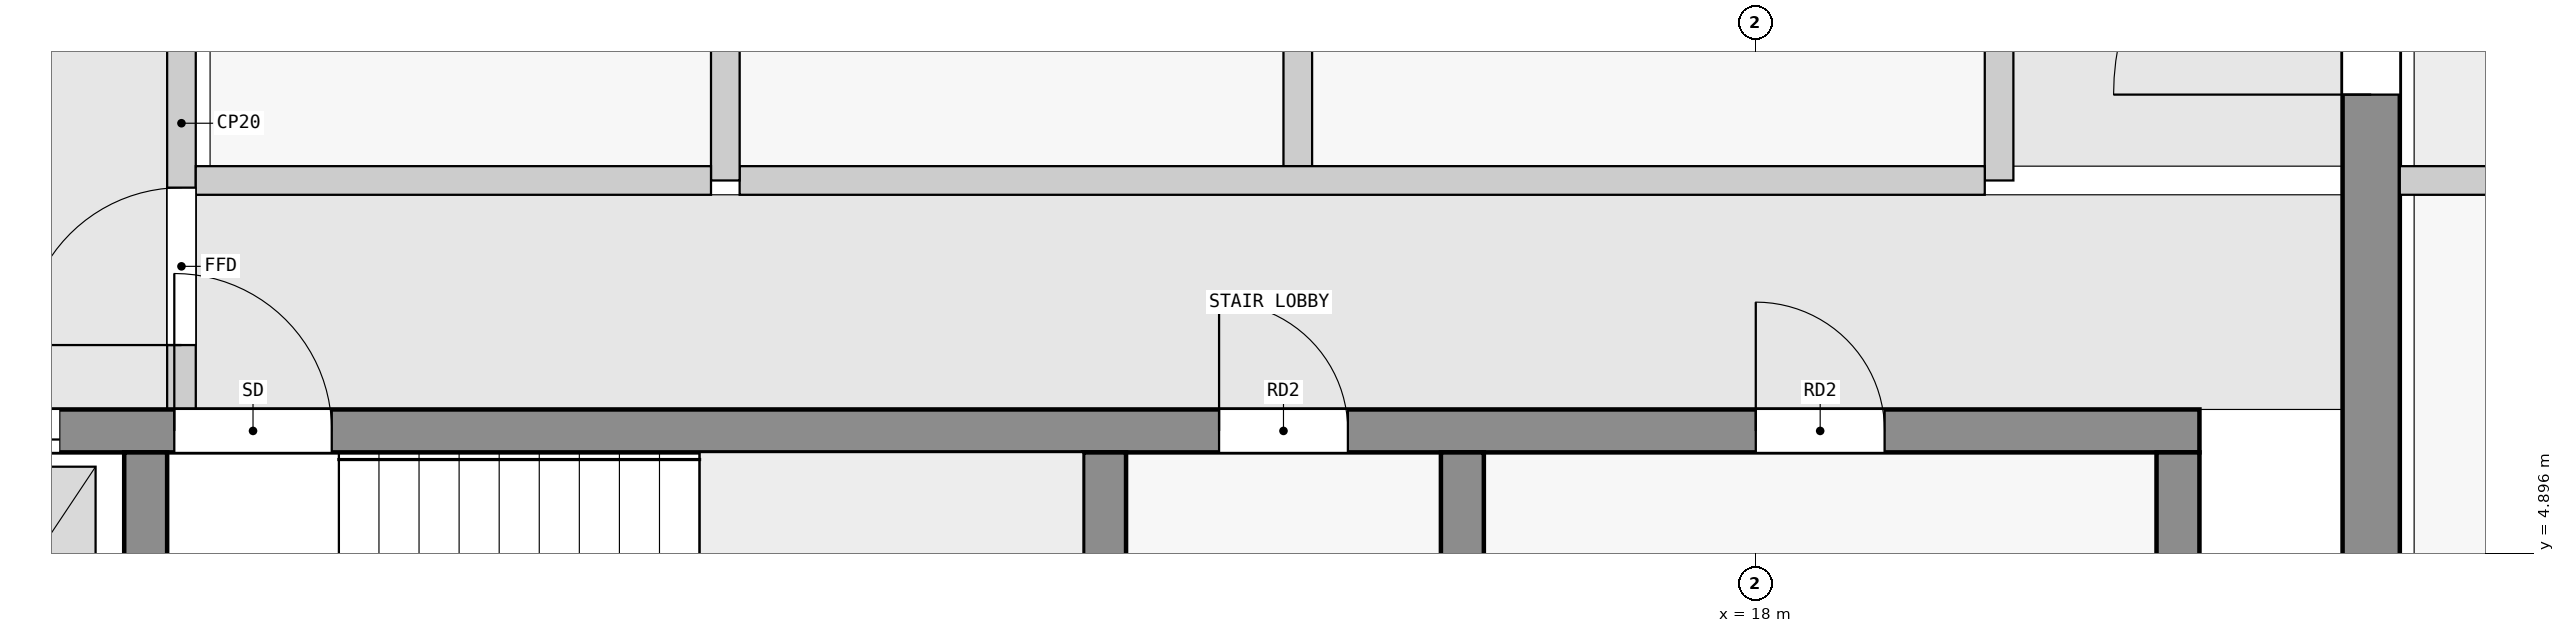
"""IFC4 building model, lengths in metres.
Left out: names, types, materials, properties, quantities, classifications, styles, units other than length and angle.
Written with IfcOpenShell. Run it as: python <this file> out.ifc"""

import sys

from ifc_helpers import new_model, si_unit, direction, frame, frame_2d, origin, place, context, subcontext, project, spatial, rectangle, extrude, element, fill, save


model = new_model("IFC4")
c1 = context("Model", 3, precision=1e-05, world=origin(), true_north=direction((0.0, 1.0)))
c2 = subcontext(c1, "Body", "Model", "MODEL_VIEW")
j1 = project(units=[si_unit("LENGTHUNIT", "METRE"), si_unit("PLANEANGLEUNIT", "RADIAN")], contexts=[c1])
p1 = place(None, origin())
s1 = spatial("IfcSite", under=j1, at=p1, CompositionType="ELEMENT")
p2 = place(p1, origin())
s2 = spatial("IfcBuilding", under=s1, at=p2, CompositionType="ELEMENT")
p3 = place(p2, frame((0.0, 0.0, 298.4)))
s3 = spatial("IfcBuildingStorey", under=s2, at=p3, CompositionType="ELEMENT", Elevation=298.4)
p4 = place(p3, frame((22.3, 2.5, 0.0), z_axis=(0.0, 0.0, 1.0), x_axis=(0.0, 1.0, 0.0)))
e1 = element("IfcWall", 1, at=p4, inside=s3, PredefinedType="SHEAR", context=c2, shape_type="SweptSolid", body=[
    extrude(rectangle(XDim=15.1, YDim=0.4, at=frame_2d((7.55, 0.0))), origin(), (0.0, 0.0, 1.0), 3.05),
])
p5 = place(p4, frame((5.6, 0.0, 0.0)))
e2 = element("IfcOpeningElement", 2, at=p5, cuts=e1, PredefinedType="OPENING", context=c2, shape_type="SweptSolid", body=[
    extrude(rectangle(XDim=1.8, YDim=2.1, at=frame_2d((0.9, 1.05))), frame((0.0, 0.21, 0.0), z_axis=(0.0, -1.0, 0.0), x_axis=(1.0, 0.0, 0.0)), (0.0, 0.0, 1.0), 0.42),
])
for number, where, z_axis, x_axis in (
    (3, (6.75, 2.8, 0.0), (0.0, 0.0, 1.0), (0.0, 1.0, 0.0)),
    (4, (13.45, 2.8, 0.0), (0.0, 0.0, 1.0), (0.0, 1.0, 0.0)),
    (5, (15.95, 2.8, 0.0), (0.0, 0.0, 1.0), (0.0, 1.0, 0.0)),
    (6, (20.95, 2.8, 0.0), (0.0, 0.0, 1.0), (0.0, 1.0, 0.0)),
):
    element("IfcWall", number, at=place(p3, frame(where, z_axis=z_axis, x_axis=x_axis)), inside=s3, PredefinedType="SHEAR", context=c2, shape_type="SweptSolid", body=[
        extrude(rectangle(XDim=2.8, YDim=0.3, at=frame_2d((1.4, 0.0))), origin(), (0.0, 0.0, 1.0), 3.05),
    ])
p6 = place(p3, frame((2.3, 5.75, 0.0), z_axis=(0.0, 0.0, 1.0), x_axis=(1.0, 0.0, 0.0)))
e7 = element("IfcWall", 7, at=p6, inside=s3, PredefinedType="SHEAR", context=c2, shape_type="SweptSolid", body=[
    extrude(rectangle(XDim=18.8, YDim=0.3, at=frame_2d((9.4, 0.0))), origin(), (0.0, 0.0, 1.0), 3.05),
])
p7 = place(p6, frame((4.65, 0.0, 0.0)))
e8 = element("IfcOpeningElement", 8, at=p7, cuts=e7, PredefinedType="OPENING", context=c2, shape_type="SweptSolid", body=[
    extrude(rectangle(XDim=1.1, YDim=2.1, at=frame_2d((0.55, 1.05))), frame((0.0, 0.16, 0.0), z_axis=(0.0, -1.0, 0.0), x_axis=(1.0, 0.0, 0.0)), (0.0, 0.0, 1.0), 0.32),
])
p8 = place(p6, frame((0.45, 0.0, 0.0)))
e9 = element("IfcOpeningElement", 9, at=p8, cuts=e7, PredefinedType="OPENING", context=c2, shape_type="SweptSolid", body=[
    extrude(rectangle(XDim=1.1, YDim=2.1, at=frame_2d((0.55, 1.05))), frame((0.0, 0.16, 0.0), z_axis=(0.0, -1.0, 0.0), x_axis=(1.0, 0.0, 0.0)), (0.0, 0.0, 1.0), 0.32),
])
p9 = place(p6, frame((2.75, 0.0, 0.0)))
e10 = element("IfcOpeningElement", 10, at=p9, cuts=e7, PredefinedType="OPENING", context=c2, shape_type="SweptSolid", body=[
    extrude(rectangle(XDim=1.1, YDim=2.1, at=frame_2d((0.55, 1.05))), frame((0.0, 0.16, 0.0), z_axis=(0.0, -1.0, 0.0), x_axis=(1.0, 0.0, 0.0)), (0.0, 0.0, 1.0), 0.32),
])
p10 = place(p6, frame((11.95, 0.0, 0.0)))
e11 = element("IfcOpeningElement", 11, at=p10, cuts=e7, PredefinedType="OPENING", context=c2, shape_type="SweptSolid", body=[
    extrude(rectangle(XDim=0.9, YDim=2.1, at=frame_2d((0.45, 1.05))), frame((0.0, 0.16, 0.0), z_axis=(0.0, -1.0, 0.0), x_axis=(1.0, 0.0, 0.0)), (0.0, 0.0, 1.0), 0.32),
])
p11 = place(p6, frame((15.7, 0.0, 0.0)))
e12 = element("IfcOpeningElement", 12, at=p11, cuts=e7, PredefinedType="OPENING", context=c2, shape_type="SweptSolid", body=[
    extrude(rectangle(XDim=0.9, YDim=2.1, at=frame_2d((0.45, 1.05))), frame((0.0, 0.16, 0.0), z_axis=(0.0, -1.0, 0.0), x_axis=(1.0, 0.0, 0.0)), (0.0, 0.0, 1.0), 0.32),
])
p12 = place(p3, frame((7.0, 5.9, 0.0), z_axis=(0.0, 0.0, 1.0), x_axis=(0.0, 1.0, 0.0)))
e13 = element("IfcWall", 13, at=p12, inside=s3, PredefinedType="PARTITIONING", context=c2, shape_type="SweptSolid", body=[
    extrude(rectangle(XDim=4.0, YDim=0.2, at=frame_2d((2.0, 0.0))), origin(), (0.0, 0.0, 1.0), 3.05),
])
p13 = place(p12, frame((0.45, 0.0, 0.0)))
e14 = element("IfcOpeningElement", 14, at=p13, cuts=e13, PredefinedType="OPENING", context=c2, shape_type="SweptSolid", body=[
    extrude(rectangle(XDim=1.1, YDim=2.1, at=frame_2d((0.55, 1.05))), frame((0.0, 0.11, 0.0), z_axis=(0.0, -1.0, 0.0), x_axis=(1.0, 0.0, 0.0)), (0.0, 0.0, 1.0), 0.22),
])
p14 = place(p3, frame((7.1, 7.5, 0.0), z_axis=(0.0, 0.0, 1.0), x_axis=(1.0, 0.0, 0.0)))
e15 = element("IfcWall", 15, at=p14, inside=s3, PredefinedType="PARTITIONING", context=c2, shape_type="SweptSolid", body=[
    extrude(rectangle(XDim=3.6, YDim=0.2, at=frame_2d((1.8, 0.0))), origin(), (0.0, 0.0, 1.0), 3.05),
])
p15 = place(p3, frame((10.8, 7.5, 0.0), z_axis=(0.0, 0.0, 1.0), x_axis=(0.0, 1.0, 0.0)))
e16 = element("IfcWall", 16, at=p15, inside=s3, PredefinedType="PARTITIONING", context=c2, shape_type="SweptSolid", body=[
    extrude(rectangle(XDim=4.7, YDim=0.2, at=frame_2d((2.35, 0.0))), origin(), (0.0, 0.0, 1.0), 3.05),
])
p16 = place(p3, frame((10.9, 7.5, 0.0), z_axis=(0.0, 0.0, 1.0), x_axis=(1.0, 0.0, 0.0)))
e17 = element("IfcWall", 17, at=p16, inside=s3, PredefinedType="PARTITIONING", context=c2, shape_type="SweptSolid", body=[
    extrude(rectangle(XDim=8.7, YDim=0.2, at=frame_2d((4.35, 0.0))), origin(), (0.0, 0.0, 1.0), 3.05),
])
p17 = place(p3, frame((19.7, 7.5, 0.0), z_axis=(0.0, 0.0, 1.0), x_axis=(0.0, 1.0, 0.0)))
e18 = element("IfcWall", 18, at=p17, inside=s3, PredefinedType="PARTITIONING", context=c2, shape_type="SweptSolid", body=[
    extrude(rectangle(XDim=4.7, YDim=0.2, at=frame_2d((2.35, 0.0))), origin(), (0.0, 0.0, 1.0), 3.05),
])
for number, where, z_axis, x_axis in (
    (19, (14.8, 7.6, 0.0), (0.0, 0.0, 1.0), (0.0, 1.0, 0.0)),
    (20, (27.0, 7.5, 0.0), (0.0, 0.0, 1.0), (-1.0, 0.0, 0.0)),
):
    element("IfcWall", number, at=place(p3, frame(where, z_axis=z_axis, x_axis=x_axis)), inside=s3, PredefinedType="PARTITIONING", context=c2, shape_type="SweptSolid", body=[
        extrude(rectangle(XDim=4.5, YDim=0.2, at=frame_2d((2.25, 0.0))), origin(), (0.0, 0.0, 1.0), 3.05),
    ])
p18 = place(p13, origin())
e21 = element("IfcDoor", 21, at=p18, inside=s3, OperationType="SINGLE_SWING_LEFT", PredefinedType="DOOR", context=c2, shape_type="SweptSolid", body=[
    extrude(rectangle(XDim=1.1, YDim=2.1, at=frame_2d((0.55, 1.05))), frame((0.0, 0.025, 0.0), z_axis=(0.0, -1.0, 0.0), x_axis=(1.0, 0.0, 0.0)), (0.0, 0.0, 1.0), 0.05),
])
fill(e14, e21)
p19 = place(p7, origin())
e22 = element("IfcDoor", 22, at=p19, inside=s3, OperationType="SINGLE_SWING_LEFT", PredefinedType="DOOR", context=c2, shape_type="SweptSolid", body=[
    extrude(rectangle(XDim=1.1, YDim=2.1, at=frame_2d((0.55, 1.05))), frame((0.0, 0.025, 0.0), z_axis=(0.0, -1.0, 0.0), x_axis=(1.0, 0.0, 0.0)), (0.0, 0.0, 1.0), 0.05),
])
fill(e8, e22)
p20 = place(p9, origin())
e23 = element("IfcDoor", 23, at=p20, inside=s3, OperationType="DOUBLE_DOOR_SLIDING", PredefinedType="DOOR", context=c2, shape_type="SweptSolid", body=[
    extrude(rectangle(XDim=1.1, YDim=2.1, at=frame_2d((0.55, 1.05))), frame((0.0, 0.025, 0.0), z_axis=(0.0, -1.0, 0.0), x_axis=(1.0, 0.0, 0.0)), (0.0, 0.0, 1.0), 0.05),
])
fill(e10, e23)
p21 = place(p5, origin())
e24 = element("IfcDoor", 24, at=p21, inside=s3, OperationType="DOUBLE_DOOR_SINGLE_SWING", PredefinedType="DOOR", context=c2, shape_type="SweptSolid", body=[
    extrude(rectangle(XDim=1.8, YDim=2.1, at=frame_2d((0.9, 1.05))), frame((0.0, 0.025, 0.0), z_axis=(0.0, -1.0, 0.0), x_axis=(1.0, 0.0, 0.0)), (0.0, 0.0, 1.0), 0.05),
])
fill(e2, e24)
p22 = place(p10, origin())
e25 = element("IfcDoor", 25, at=p22, inside=s3, OperationType="SINGLE_SWING_LEFT", PredefinedType="DOOR", context=c2, shape_type="SweptSolid", body=[
    extrude(rectangle(XDim=0.9, YDim=2.1, at=frame_2d((0.45, 1.05))), frame((0.0, 0.025, 0.0), z_axis=(0.0, -1.0, 0.0), x_axis=(1.0, 0.0, 0.0)), (0.0, 0.0, 1.0), 0.05),
])
fill(e11, e25)
p23 = place(p11, origin())
e26 = element("IfcDoor", 26, at=p23, inside=s3, OperationType="SINGLE_SWING_LEFT", PredefinedType="DOOR", context=c2, shape_type="SweptSolid", body=[
    extrude(rectangle(XDim=0.9, YDim=2.1, at=frame_2d((0.45, 1.05))), frame((0.0, 0.025, 0.0), z_axis=(0.0, -1.0, 0.0), x_axis=(1.0, 0.0, 0.0)), (0.0, 0.0, 1.0), 0.05),
])
fill(e12, e26)
save(model, sys.argv[1])
